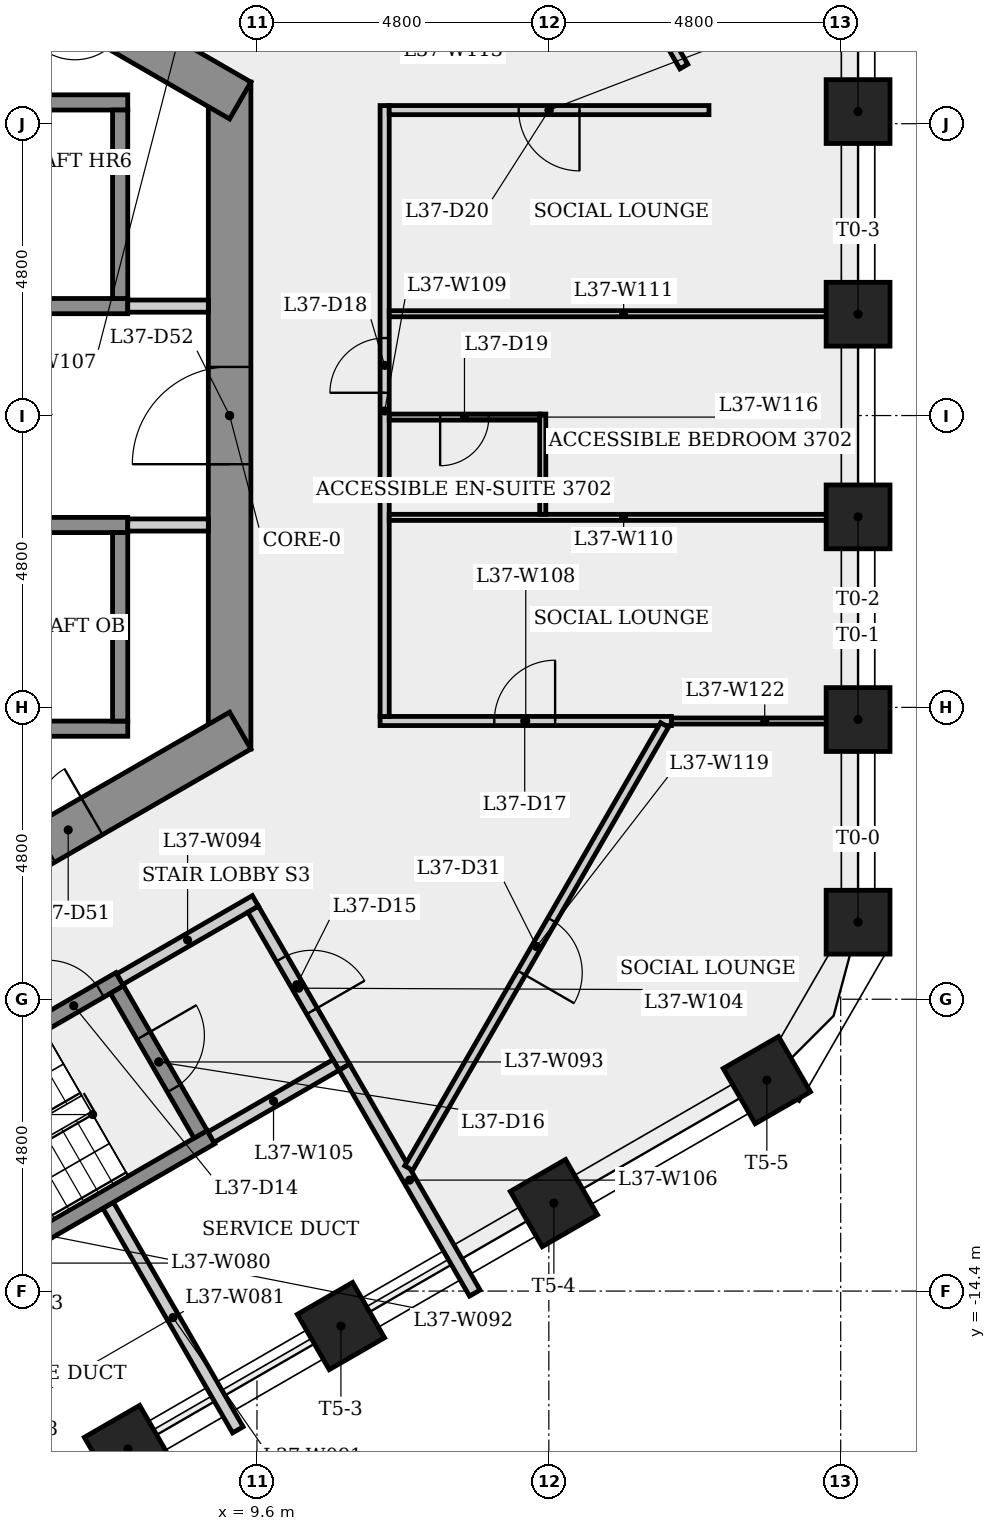
"""IFC4 building model, lengths in metres.
Left out: names, types, materials, properties, quantities, classifications, styles, units other than length and angle.
Written with IfcOpenShell. Run it as: python <this file> out.ifc"""

import sys

from ifc_helpers import new_model, si_unit, direction, frame, frame_2d, origin, origin_2d, place, context, subcontext, project, spatial, rectangle, extrude, element, fill, save


model = new_model("IFC4")
c1 = context("Model", 3, precision=1e-05, world=origin(), true_north=direction((0.0, 1.0)))
c2 = subcontext(c1, "Body", "Model", "MODEL_VIEW")
j1 = project(units=[si_unit("LENGTHUNIT", "METRE"), si_unit("PLANEANGLEUNIT", "RADIAN")], contexts=[c1])
p1 = place(None, origin())
s1 = spatial("IfcSite", under=j1, at=p1, CompositionType="ELEMENT")
p2 = place(p1, origin())
s2 = spatial("IfcBuilding", under=s1, at=p2, CompositionType="ELEMENT")
p3 = place(p2, frame((0.0, 0.0, 139.9)))
s3 = spatial("IfcBuildingStorey", under=s2, at=p3, CompositionType="ELEMENT", Elevation=139.9)
p4 = place(p3, frame((9.15, -5.485, 0.0), z_axis=(0.0, 0.0, 1.0), x_axis=(0.0, 1.0, 0.0)))
e1 = element("IfcWall", 1, at=p4, inside=s3, PredefinedType="SHEAR", context=c2, shape_type="SweptSolid", body=[
    extrude(rectangle(XDim=10.97, YDim=0.7, at=frame_2d((5.485, 0.0))), origin(), (0.0, 0.0, 1.0), 4.0),
])
p5 = place(p4, frame((4.685, 0.0, 0.0)))
e2 = element("IfcOpeningElement", 2, at=p5, cuts=e1, PredefinedType="OPENING", context=c2, shape_type="SweptSolid", body=[
    extrude(rectangle(XDim=1.6, YDim=2.1, at=frame_2d((0.8, 1.05))), frame((0.0, 0.36, 0.0), z_axis=(0.0, -1.0, 0.0), x_axis=(1.0, 0.0, 0.0)), (0.0, 0.0, 1.0), 0.72),
])
p6 = place(p3, frame((9.325, 5.182, 0.0), z_axis=(0.0, 0.0, 1.0), x_axis=(-0.866023993627, 0.500002442456, 0.0)))
e3 = element("IfcWall", 3, at=p6, inside=s3, PredefinedType="SHEAR", context=c2, shape_type="SweptSolid", body=[
    extrude(rectangle(XDim=10.97, YDim=0.7, at=frame_2d((5.485, 0.0))), origin(), (0.0, 0.0, 1.0), 4.0),
])
p7 = place(p6, frame((8.96, 0.0, 0.0)))
e4 = element("IfcOpeningElement", 4, at=p7, cuts=e3, PredefinedType="OPENING", context=c2, shape_type="SweptSolid", body=[
    extrude(rectangle(XDim=0.9, YDim=2.1, at=frame_2d((0.45, 1.05))), frame((0.0, 0.36, 0.0), z_axis=(0.0, -1.0, 0.0), x_axis=(1.0, 0.0, 0.0)), (0.0, 0.0, 1.0), 0.72),
])
p8 = place(p6, frame((2.24, 0.0, 0.0)))
e5 = element("IfcOpeningElement", 5, at=p8, cuts=e3, PredefinedType="OPENING", context=c2, shape_type="SweptSolid", body=[
    extrude(rectangle(XDim=0.9, YDim=2.1, at=frame_2d((0.45, 1.05))), frame((0.0, 0.36, 0.0), z_axis=(0.0, -1.0, 0.0), x_axis=(1.0, 0.0, 0.0)), (0.0, 0.0, 1.0), 0.72),
])
p9 = place(p3, frame((-0.175, -10.667, 0.0), z_axis=(0.0, 0.0, 1.0), x_axis=(0.866023993627, 0.500002442456, 0.0)))
e6 = element("IfcWall", 6, at=p9, inside=s3, PredefinedType="SHEAR", context=c2, shape_type="SweptSolid", body=[
    extrude(rectangle(XDim=10.97, YDim=0.7, at=frame_2d((5.485, 0.0))), origin(), (0.0, 0.0, 1.0), 4.0),
])
p10 = place(p9, frame((7.252, 0.0, 0.0)))
e7 = element("IfcOpeningElement", 7, at=p10, cuts=e6, PredefinedType="OPENING", context=c2, shape_type="SweptSolid", body=[
    extrude(rectangle(XDim=0.9, YDim=2.1, at=frame_2d((0.45, 1.05))), frame((0.0, 0.36, 0.0), z_axis=(0.0, -1.0, 0.0), x_axis=(1.0, 0.0, 0.0)), (0.0, 0.0, 1.0), 0.72),
])
for number, where, z_axis, x_axis in (
    (8, (19.486, -8.333, 0.0), (0.0, 0.0, 1.0), (1.0, 0.0, 0.0)),
    (9, (19.486, -5.0, 0.0), (0.0, 0.0, 1.0), (1.0, 0.0, 0.0)),
    (10, (19.486, -1.667, 0.0), (0.0, 0.0, 1.0), (1.0, 0.0, 0.0)),
    (11, (19.486, 1.667, 0.0), (0.0, 0.0, 1.0), (1.0, 0.0, 0.0)),
    (12, (19.486, 5.0, 0.0), (0.0, 0.0, 1.0), (1.0, 0.0, 0.0)),
    (13, (7.479, -16.997, 0.0), (0.0, 0.0, 1.0), (0.5, -0.866, 0.0)),
    (14, (10.981, -14.975, 0.0), (0.0, 0.0, 1.0), (0.5, -0.866, 0.0)),
    (15, (14.483, -12.953, 0.0), (0.0, 0.0, 1.0), (0.5, -0.866, 0.0)),
    (16, (17.986, -10.931, 0.0), (0.0, 0.0, 1.0), (0.5, -0.866, 0.0)),
):
    element("IfcColumn", number, at=place(p3, frame(where, z_axis=z_axis, x_axis=x_axis)), inside=s3, PredefinedType="COLUMN", context=c2, shape_type="SweptSolid", body=[
        extrude(rectangle(XDim=1.05, YDim=1.05, at=origin_2d()), origin(), (0.0, 0.0, 1.0), 4.0),
    ])
p11 = place(p3, frame((-7.475, 1.8, 0.0), z_axis=(0.0, 0.0, 1.0), x_axis=(1.0, 0.0, 0.0)))
e17 = element("IfcWall", 17, at=p11, inside=s3, PredefinedType="SHEAR", context=c2, shape_type="SweptSolid", body=[
    extrude(rectangle(XDim=14.95, YDim=0.25, at=frame_2d((7.475, 0.0))), origin(), (0.0, 0.0, 1.0), 3.6),
])
for number, where, z_axis, x_axis in (
    (18, (-7.225, 5.15, 0.0), (0.0, 0.0, 1.0), (1.0, 0.0, 0.0)),
    (19, (-7.225, -5.15, 0.0), (0.0, 0.0, 1.0), (1.0, 0.0, 0.0)),
):
    element("IfcWall", number, at=place(p3, frame(where, z_axis=z_axis, x_axis=x_axis)), inside=s3, PredefinedType="SHEAR", context=c2, shape_type="SweptSolid", body=[
        extrude(rectangle(XDim=14.7, YDim=0.25, at=frame_2d((7.35, 0.0))), origin(), (0.0, 0.0, 1.0), 3.6),
    ])
p12 = place(p3, frame((-7.225, -1.8, 0.0), z_axis=(0.0, 0.0, 1.0), x_axis=(1.0, 0.0, 0.0)))
e20 = element("IfcWall", 20, at=p12, inside=s3, PredefinedType="SHEAR", context=c2, shape_type="SweptSolid", body=[
    extrude(rectangle(XDim=14.7, YDim=0.25, at=frame_2d((7.35, 0.0))), origin(), (0.0, 0.0, 1.0), 3.6),
])
p13 = place(p12, frame((0.597, 0.0, 0.0)))
e21 = element("IfcOpeningElement", 21, at=p13, cuts=e20, PredefinedType="OPENING", context=c2, shape_type="SweptSolid", body=[
    extrude(rectangle(XDim=1.1, YDim=2.1, at=frame_2d((0.55, 1.05))), frame((0.0, 0.135, 0.0), z_axis=(0.0, -1.0, 0.0), x_axis=(1.0, 0.0, 0.0)), (0.0, 0.0, 1.0), 0.27),
])
p14 = place(p12, frame((3.0, 0.0, 0.0)))
e22 = element("IfcOpeningElement", 22, at=p14, cuts=e20, PredefinedType="OPENING", context=c2, shape_type="SweptSolid", body=[
    extrude(rectangle(XDim=1.1, YDim=2.1, at=frame_2d((0.55, 1.05))), frame((0.0, 0.135, 0.0), z_axis=(0.0, -1.0, 0.0), x_axis=(1.0, 0.0, 0.0)), (0.0, 0.0, 1.0), 0.27),
])
p15 = place(p12, frame((5.45, 0.0, 0.0)))
e23 = element("IfcOpeningElement", 23, at=p15, cuts=e20, PredefinedType="OPENING", context=c2, shape_type="SweptSolid", body=[
    extrude(rectangle(XDim=1.1, YDim=2.1, at=frame_2d((0.55, 1.05))), frame((0.0, 0.135, 0.0), z_axis=(0.0, -1.0, 0.0), x_axis=(1.0, 0.0, 0.0)), (0.0, 0.0, 1.0), 0.27),
])
p16 = place(p12, frame((7.9, 0.0, 0.0)))
e24 = element("IfcOpeningElement", 24, at=p16, cuts=e20, PredefinedType="OPENING", context=c2, shape_type="SweptSolid", body=[
    extrude(rectangle(XDim=1.1, YDim=2.1, at=frame_2d((0.55, 1.05))), frame((0.0, 0.135, 0.0), z_axis=(0.0, -1.0, 0.0), x_axis=(1.0, 0.0, 0.0)), (0.0, 0.0, 1.0), 0.27),
])
p17 = place(p12, frame((10.35, 0.0, 0.0)))
e25 = element("IfcOpeningElement", 25, at=p17, cuts=e20, PredefinedType="OPENING", context=c2, shape_type="SweptSolid", body=[
    extrude(rectangle(XDim=1.1, YDim=2.1, at=frame_2d((0.55, 1.05))), frame((0.0, 0.135, 0.0), z_axis=(0.0, -1.0, 0.0), x_axis=(1.0, 0.0, 0.0)), (0.0, 0.0, 1.0), 0.27),
])
p18 = place(p3, frame((1.585, -12.595, 0.0), z_axis=(0.0, 0.0, 1.0), x_axis=(0.866036417653, 0.499980922934, 0.0)))
e26 = element("IfcWall", 26, at=p18, inside=s3, PredefinedType="SHEAR", context=c2, shape_type="SweptSolid", body=[
    extrude(rectangle(XDim=6.65, YDim=0.25, at=frame_2d((3.325, 0.0))), origin(), (0.0, 0.0, 1.0), 3.6),
])
p19 = place(p18, frame((5.275, 0.0, 0.0)))
e27 = element("IfcOpeningElement", 27, at=p19, cuts=e26, PredefinedType="OPENING", context=c2, shape_type="SweptSolid", body=[
    extrude(rectangle(XDim=1.0, YDim=2.1, at=frame_2d((0.5, 1.05))), frame((0.0, 0.135, 0.0), z_axis=(0.0, -1.0, 0.0), x_axis=(1.0, 0.0, 0.0)), (0.0, 0.0, 1.0), 0.27),
])
p20 = place(p3, frame((7.153, -12.989, 0.0), z_axis=(0.0, 0.0, 1.0), x_axis=(0.500029638619, -0.866008291244, 0.0)))
e28 = element("IfcWall", 28, at=p20, inside=s3, PredefinedType="PLUMBINGWALL", context=c2, shape_type="SweptSolid", body=[
    extrude(rectangle(XDim=4.265, YDim=0.2, at=frame_2d((2.133, 0.0))), origin(), (0.0, 0.0, 1.0), 3.6),
])
p21 = place(p3, frame((3.301, -15.068, 0.0), z_axis=(0.0, 0.0, 1.0), x_axis=(0.866035036182, 0.499983315828, 0.0)))
e29 = element("IfcWall", 29, at=p21, inside=s3, PredefinedType="SHEAR", context=c2, shape_type="SweptSolid", body=[
    extrude(rectangle(XDim=6.4, YDim=0.25, at=frame_2d((3.2, 0.0))), origin(), (0.0, 0.0, 1.0), 4.0),
])
p22 = place(p3, frame((7.298, -9.441, 0.0), z_axis=(0.0, 0.0, 1.0), x_axis=(0.500034990121, -0.866005201286, 0.0)))
e30 = element("IfcWall", 30, at=p22, inside=s3, PredefinedType="SHEAR", context=c2, shape_type="SweptSolid", body=[
    extrude(rectangle(XDim=2.75, YDim=0.25, at=frame_2d((1.375, 0.0))), origin(), (0.0, 0.0, 1.0), 3.6),
])
p23 = place(p22, frame((0.875, 0.0, 0.0)))
e31 = element("IfcOpeningElement", 31, at=p23, cuts=e30, PredefinedType="OPENING", context=c2, shape_type="SweptSolid", body=[
    extrude(rectangle(XDim=1.0, YDim=2.1, at=frame_2d((0.5, 1.05))), frame((0.0, 0.135, 0.0), z_axis=(0.0, -1.0, 0.0), x_axis=(1.0, 0.0, 0.0)), (0.0, 0.0, 1.0), 0.27),
])
p24 = place(p3, frame((7.344, -9.27, 0.0), z_axis=(0.0, 0.0, 1.0), x_axis=(0.866005588531, 0.500034319456, 0.0)))
e32 = element("IfcWall", 32, at=p24, inside=s3, PredefinedType="PARTITIONING", context=c2, shape_type="SweptSolid", body=[
    extrude(rectangle(XDim=2.575, YDim=0.2, at=frame_2d((1.288, 0.0))), origin(), (0.0, 0.0, 1.0), 3.6),
])
p25 = place(p3, frame((7.475, 1.8, 0.0), z_axis=(0.0, 0.0, 1.0), x_axis=(1.0, 0.0, 0.0)))
e33 = element("IfcWall", 33, at=p25, inside=s3, PredefinedType="PARTITIONING", context=c2, shape_type="SweptSolid", body=[
    extrude(rectangle(XDim=1.325, YDim=0.2, at=frame_2d((0.663, 0.0))), origin(), (0.0, 0.0, 1.0), 3.6),
])
for number, where, z_axis, x_axis in (
    (34, (7.35, -1.925, 0.0), (0.0, 0.0, 1.0), (0.0, -1.0, 0.0)),
    (35, (7.35, 5.025, 0.0), (0.0, 0.0, 1.0), (0.0, -1.0, 0.0)),
):
    element("IfcWall", number, at=place(p3, frame(where, z_axis=z_axis, x_axis=x_axis)), inside=s3, PredefinedType="SHEAR", context=c2, shape_type="SweptSolid", body=[
        extrude(rectangle(XDim=3.1, YDim=0.25, at=frame_2d((1.55, 0.0))), origin(), (0.0, 0.0, 1.0), 4.0),
    ])
p26 = place(p3, frame((8.8, -1.8, 0.0), z_axis=(0.0, 0.0, 1.0), x_axis=(-1.0, 0.0, 0.0)))
e36 = element("IfcWall", 36, at=p26, inside=s3, PredefinedType="PARTITIONING", context=c2, shape_type="SweptSolid", body=[
    extrude(rectangle(XDim=1.325, YDim=0.2, at=frame_2d((0.663, 0.0))), origin(), (0.0, 0.0, 1.0), 3.6),
])
p27 = place(p3, frame((9.537, -8.119, 0.0), z_axis=(0.0, 0.0, 1.0), x_axis=(0.499990139034, -0.866031096941, 0.0)))
e37 = element("IfcWall", 37, at=p27, inside=s3, PredefinedType="PARTITIONING", context=c2, shape_type="SweptSolid", body=[
    extrude(rectangle(XDim=3.0, YDim=0.2, at=frame_2d((1.5, 0.0))), origin(), (0.0, 0.0, 1.0), 3.6),
])
p28 = place(p27, frame((0.935, 0.0, 0.0)))
e38 = element("IfcOpeningElement", 38, at=p28, cuts=e37, PredefinedType="OPENING", context=c2, shape_type="SweptSolid", body=[
    extrude(rectangle(XDim=1.0, YDim=2.1, at=frame_2d((0.5, 1.05))), frame((0.0, 0.11, 0.0), z_axis=(0.0, -1.0, 0.0), x_axis=(1.0, 0.0, 0.0)), (0.0, 0.0, 1.0), 0.22),
])
p29 = place(p3, frame((10.901, -10.681, 0.0), z_axis=(0.0, 0.0, 1.0), x_axis=(-0.866007538022, -0.500030943131, 0.0)))
e39 = element("IfcWall", 39, at=p29, inside=s3, PredefinedType="PLUMBINGWALL", context=c2, shape_type="SweptSolid", body=[
    extrude(rectangle(XDim=2.375, YDim=0.2, at=frame_2d((1.188, 0.0))), origin(), (0.0, 0.0, 1.0), 3.6),
])
p30 = place(p3, frame((11.037, -10.717, 0.0), z_axis=(0.0, 0.0, 1.0), x_axis=(0.499995032058, -0.866028272008, 0.0)))
e40 = element("IfcWall", 40, at=p30, inside=s3, PredefinedType="PLUMBINGWALL", context=c2, shape_type="SweptSolid", body=[
    extrude(rectangle(XDim=4.29, YDim=0.2, at=frame_2d((2.145, 0.0))), origin(), (0.0, 0.0, 1.0), 3.6),
])
p31 = place(p3, frame((11.625, -5.024, 0.0), z_axis=(0.0, 0.0, 1.0), x_axis=(1.0, 0.0, 0.0)))
e41 = element("IfcWall", 41, at=p31, inside=s3, PredefinedType="PARTITIONING", context=c2, shape_type="SweptSolid", body=[
    extrude(rectangle(XDim=4.791, YDim=0.15, at=frame_2d((2.396, 0.0))), origin(), (0.0, 0.0, 1.0), 3.6),
])
p32 = place(p31, frame((1.878, 0.0, 0.0)))
e42 = element("IfcOpeningElement", 42, at=p32, cuts=e41, PredefinedType="OPENING", context=c2, shape_type="SweptSolid", body=[
    extrude(rectangle(XDim=1.0, YDim=2.1, at=frame_2d((0.5, 1.05))), frame((0.0, 0.085, 0.0), z_axis=(0.0, -1.0, 0.0), x_axis=(1.0, 0.0, 0.0)), (0.0, 0.0, 1.0), 0.17),
])
p33 = place(p3, frame((11.7, -4.949, 0.0), z_axis=(0.0, 0.0, 1.0), x_axis=(0.0, 1.0, 0.0)))
e43 = element("IfcWall", 43, at=p33, inside=s3, PredefinedType="PARTITIONING", context=c2, shape_type="SweptSolid", body=[
    extrude(rectangle(XDim=10.048, YDim=0.15, at=frame_2d((5.024, 0.0))), origin(), (0.0, 0.0, 1.0), 3.6),
])
p34 = place(p33, frame((5.323, 0.0, 0.0)))
e44 = element("IfcOpeningElement", 44, at=p34, cuts=e43, PredefinedType="OPENING", context=c2, shape_type="SweptSolid", body=[
    extrude(rectangle(XDim=0.9, YDim=2.1, at=frame_2d((0.45, 1.05))), frame((0.0, 0.085, 0.0), z_axis=(0.0, -1.0, 0.0), x_axis=(1.0, 0.0, 0.0)), (0.0, 0.0, 1.0), 0.17),
])
for number, where, z_axis, x_axis in (
    (45, (11.775, -1.675, 0.0), (0.0, 0.0, 1.0), (1.0, 0.0, 0.0)),
    (46, (11.775, 1.675, 0.0), (0.0, 0.0, 1.0), (1.0, 0.0, 0.0)),
):
    element("IfcWall", number, at=place(p3, frame(where, z_axis=z_axis, x_axis=x_axis)), inside=s3, PredefinedType="PARTITIONING", context=c2, shape_type="SweptSolid", body=[
        extrude(rectangle(XDim=7.711, YDim=0.1, at=frame_2d((3.855, 0.0))), origin(), (0.0, 0.0, 1.0), 3.6),
    ])
p35 = place(p3, frame((14.3, -1.625, 0.0), z_axis=(0.0, 0.0, 1.0), x_axis=(0.0, 1.0, 0.0)))
e47 = element("IfcWall", 47, at=p35, inside=s3, PredefinedType="PARTITIONING", context=c2, shape_type="SweptSolid", body=[
    extrude(rectangle(XDim=1.649, YDim=0.1, at=frame_2d((0.825, 0.0))), origin(), (0.0, 0.0, 1.0), 3.6),
])
p36 = place(p3, frame((14.25, -0.025, 0.0), z_axis=(0.0, 0.0, 1.0), x_axis=(-1.0, 0.0, 0.0)))
e48 = element("IfcWall", 48, at=p36, inside=s3, PredefinedType="PARTITIONING", context=c2, shape_type="SweptSolid", body=[
    extrude(rectangle(XDim=2.475, YDim=0.1, at=frame_2d((1.238, 0.0))), origin(), (0.0, 0.0, 1.0), 3.6),
])
p37 = place(p36, frame((0.837, 0.0, 0.0)))
e49 = element("IfcOpeningElement", 49, at=p37, cuts=e48, PredefinedType="OPENING", context=c2, shape_type="SweptSolid", body=[
    extrude(rectangle(XDim=0.8, YDim=2.1, at=frame_2d((0.4, 1.05))), frame((0.0, 0.06, 0.0), z_axis=(0.0, -1.0, 0.0), x_axis=(1.0, 0.0, 0.0)), (0.0, 0.0, 1.0), 0.12),
])
p38 = place(p3, frame((14.657, 9.14, 0.0), z_axis=(0.0, 0.0, 1.0), x_axis=(0.500011323479, -0.866018866072, 0.0)))
e50 = element("IfcWall", 50, at=p38, inside=s3, PredefinedType="PARTITIONING", context=c2, shape_type="SweptSolid", body=[
    extrude(rectangle(XDim=3.926, YDim=0.15, at=frame_2d((1.963, 0.0))), origin(), (0.0, 0.0, 1.0), 3.6),
])
p39 = place(p38, frame((1.163, 0.0, 0.0)))
e51 = element("IfcOpeningElement", 51, at=p39, cuts=e50, PredefinedType="OPENING", context=c2, shape_type="SweptSolid", body=[
    extrude(rectangle(XDim=1.6, YDim=2.1, at=frame_2d((0.8, 1.05))), frame((0.0, 0.085, 0.0), z_axis=(0.0, -1.0, 0.0), x_axis=(1.0, 0.0, 0.0)), (0.0, 0.0, 1.0), 0.17),
])
p40 = place(p3, frame((16.303, -5.089, 0.0), z_axis=(0.0, 0.0, 1.0), x_axis=(-0.499998689388, -0.866026160465, 0.0)))
e52 = element("IfcWall", 52, at=p40, inside=s3, PredefinedType="PARTITIONING", context=c2, shape_type="SweptSolid", body=[
    extrude(rectangle(XDim=8.416, YDim=0.15, at=frame_2d((4.208, 0.0))), origin(), (0.0, 0.0, 1.0), 3.6),
])
p41 = place(p40, frame((3.708, 0.0, 0.0)))
e53 = element("IfcOpeningElement", 53, at=p41, cuts=e52, PredefinedType="OPENING", context=c2, shape_type="SweptSolid", body=[
    extrude(rectangle(XDim=1.0, YDim=2.1, at=frame_2d((0.5, 1.05))), frame((0.0, 0.085, 0.0), z_axis=(0.0, -1.0, 0.0), x_axis=(1.0, 0.0, 0.0)), (0.0, 0.0, 1.0), 0.17),
])
p42 = place(p3, frame((17.034, 5.024, 0.0), z_axis=(0.0, 0.0, 1.0), x_axis=(-1.0, 0.0, 0.0)))
e54 = element("IfcWall", 54, at=p42, inside=s3, PredefinedType="PARTITIONING", context=c2, shape_type="SweptSolid", body=[
    extrude(rectangle(XDim=5.259, YDim=0.15, at=frame_2d((2.629, 0.0))), origin(), (0.0, 0.0, 1.0), 3.6),
])
p43 = place(p42, frame((2.129, 0.0, 0.0)))
e55 = element("IfcOpeningElement", 55, at=p43, cuts=e54, PredefinedType="OPENING", context=c2, shape_type="SweptSolid", body=[
    extrude(rectangle(XDim=1.0, YDim=2.1, at=frame_2d((0.5, 1.05))), frame((0.0, 0.085, 0.0), z_axis=(0.0, -1.0, 0.0), x_axis=(1.0, 0.0, 0.0)), (0.0, 0.0, 1.0), 0.17),
])
p44 = place(p3, frame((19.486, -5.024, 0.0), z_axis=(0.0, 0.0, 1.0), x_axis=(-1.0, 0.0, 0.0)))
e56 = element("IfcWall", 56, at=p44, inside=s3, PredefinedType="PARTITIONING", context=c2, shape_type="SweptSolid", body=[
    extrude(rectangle(XDim=3.07, YDim=0.1, at=frame_2d((1.535, 0.0))), origin(), (0.0, 0.0, 1.0), 3.6),
])
p45 = place(p19, origin())
e57 = element("IfcDoor", 57, at=p45, inside=s3, OperationType="SINGLE_SWING_LEFT", PredefinedType="DOOR", context=c2, shape_type="SweptSolid", body=[
    extrude(rectangle(XDim=1.0, YDim=2.1, at=frame_2d((0.5, 1.05))), frame((0.0, 0.025, 0.0), z_axis=(0.0, -1.0, 0.0), x_axis=(1.0, 0.0, 0.0)), (0.0, 0.0, 1.0), 0.05),
])
fill(e27, e57)
p46 = place(p28, origin())
e58 = element("IfcDoor", 58, at=p46, inside=s3, OperationType="SINGLE_SWING_RIGHT", PredefinedType="DOOR", context=c2, shape_type="SweptSolid", body=[
    extrude(rectangle(XDim=1.0, YDim=2.1, at=frame_2d((0.5, 1.05))), frame((0.0, 0.025, 0.0), z_axis=(0.0, -1.0, 0.0), x_axis=(1.0, 0.0, 0.0)), (0.0, 0.0, 1.0), 0.05),
])
fill(e38, e58)
p47 = place(p23, origin())
e59 = element("IfcDoor", 59, at=p47, inside=s3, OperationType="SINGLE_SWING_LEFT", PredefinedType="DOOR", context=c2, shape_type="SweptSolid", body=[
    extrude(rectangle(XDim=1.0, YDim=2.1, at=frame_2d((0.5, 1.05))), frame((0.0, 0.025, 0.0), z_axis=(0.0, -1.0, 0.0), x_axis=(1.0, 0.0, 0.0)), (0.0, 0.0, 1.0), 0.05),
])
fill(e31, e59)
p48 = place(p32, origin())
e60 = element("IfcDoor", 60, at=p48, inside=s3, OperationType="SINGLE_SWING_RIGHT", PredefinedType="DOOR", context=c2, shape_type="SweptSolid", body=[
    extrude(rectangle(XDim=1.0, YDim=2.1, at=frame_2d((0.5, 1.05))), frame((0.0, 0.025, 0.0), z_axis=(0.0, -1.0, 0.0), x_axis=(1.0, 0.0, 0.0)), (0.0, 0.0, 1.0), 0.05),
])
fill(e42, e60)
p49 = place(p34, origin())
e61 = element("IfcDoor", 61, at=p49, inside=s3, OperationType="SINGLE_SWING_LEFT", PredefinedType="DOOR", context=c2, shape_type="SweptSolid", body=[
    extrude(rectangle(XDim=0.9, YDim=2.1, at=frame_2d((0.45, 1.05))), frame((0.0, 0.025, 0.0), z_axis=(0.0, -1.0, 0.0), x_axis=(1.0, 0.0, 0.0)), (0.0, 0.0, 1.0), 0.05),
])
fill(e44, e61)
p50 = place(p37, origin())
e62 = element("IfcDoor", 62, at=p50, inside=s3, OperationType="SINGLE_SWING_RIGHT", PredefinedType="DOOR", context=c2, shape_type="SweptSolid", body=[
    extrude(rectangle(XDim=0.8, YDim=2.1, at=frame_2d((0.4, 1.05))), frame((0.0, 0.025, 0.0), z_axis=(0.0, -1.0, 0.0), x_axis=(1.0, 0.0, 0.0)), (0.0, 0.0, 1.0), 0.05),
])
fill(e49, e62)
p51 = place(p43, origin())
e63 = element("IfcDoor", 63, at=p51, inside=s3, OperationType="SINGLE_SWING_LEFT", PredefinedType="DOOR", context=c2, shape_type="SweptSolid", body=[
    extrude(rectangle(XDim=1.0, YDim=2.1, at=frame_2d((0.5, 1.05))), frame((0.0, 0.025, 0.0), z_axis=(0.0, -1.0, 0.0), x_axis=(1.0, 0.0, 0.0)), (0.0, 0.0, 1.0), 0.05),
])
fill(e55, e63)
p52 = place(p41, origin())
e64 = element("IfcDoor", 64, at=p52, inside=s3, OperationType="SINGLE_SWING_RIGHT", PredefinedType="DOOR", context=c2, shape_type="SweptSolid", body=[
    extrude(rectangle(XDim=1.0, YDim=2.1, at=frame_2d((0.5, 1.05))), frame((0.0, 0.025, 0.0), z_axis=(0.0, -1.0, 0.0), x_axis=(1.0, 0.0, 0.0)), (0.0, 0.0, 1.0), 0.05),
])
fill(e53, e64)
p53 = place(p10, origin())
e65 = element("IfcDoor", 65, at=p53, inside=s3, OperationType="SINGLE_SWING_RIGHT", PredefinedType="DOOR", context=c2, shape_type="SweptSolid", body=[
    extrude(rectangle(XDim=0.9, YDim=2.1, at=frame_2d((0.45, 1.05))), frame((0.0, 0.025, 0.0), z_axis=(0.0, -1.0, 0.0), x_axis=(1.0, 0.0, 0.0)), (0.0, 0.0, 1.0), 0.05),
])
fill(e7, e65)
p54 = place(p5, origin())
e66 = element("IfcDoor", 66, at=p54, inside=s3, OperationType="SINGLE_SWING_LEFT", PredefinedType="DOOR", context=c2, shape_type="SweptSolid", body=[
    extrude(rectangle(XDim=1.6, YDim=2.1, at=frame_2d((0.8, 1.05))), frame((0.0, 0.025, 0.0), z_axis=(0.0, -1.0, 0.0), x_axis=(1.0, 0.0, 0.0)), (0.0, 0.0, 1.0), 0.05),
])
fill(e2, e66)
save(model, sys.argv[1])
